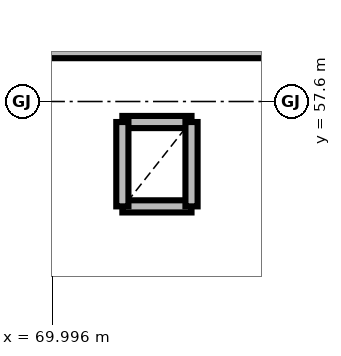
"""IFC4 building model, lengths in metres.
Left out: names, types, materials, properties, quantities, classifications, styles, units other than length and angle.
Written with IfcOpenShell. Run it as: python <this file> out.ifc"""

import sys

from ifc_helpers import new_model, si_unit, direction, frame, frame_2d, origin, place, context, subcontext, project, spatial, rectangle, extrude, element, save


model = new_model("IFC4")
c1 = context("Model", 3, precision=1e-05, world=origin(), true_north=direction((0.0, 1.0)))
c2 = subcontext(c1, "Body", "Model", "MODEL_VIEW")
j1 = project(units=[si_unit("LENGTHUNIT", "METRE"), si_unit("PLANEANGLEUNIT", "RADIAN")], contexts=[c1])
p1 = place(None, origin())
s1 = spatial("IfcSite", under=j1, at=p1, CompositionType="ELEMENT")
p2 = place(p1, origin())
s2 = spatial("IfcBuilding", under=s1, at=p2, CompositionType="ELEMENT")
p3 = place(p2, frame((0.0, 0.0, 9.3)))
s3 = spatial("IfcBuildingStorey", under=s2, at=p3, CompositionType="ELEMENT", Elevation=9.3)
p4 = place(p3, frame((70.92, 56.22, 0.0), z_axis=(0.0, 0.0, 1.0), x_axis=(1.0, 0.0, 0.0)))
e1 = element("IfcWall", 1, at=p4, inside=s3, PredefinedType="PARTITIONING", context=c2, shape_type="SweptSolid", body=[
    extrude(rectangle(XDim=0.91, YDim=0.16, at=frame_2d((0.455, 0.0))), origin(), (0.0, 0.0, 1.0), 3.475),
])
p5 = place(p3, frame((71.83, 57.33, 0.0), z_axis=(0.0, 0.0, 1.0), x_axis=(-1.0, 0.0, 0.0)))
e2 = element("IfcWall", 2, at=p5, inside=s3, PredefinedType="PARTITIONING", context=c2, shape_type="SweptSolid", body=[
    extrude(rectangle(XDim=0.91, YDim=0.16, at=frame_2d((0.455, 0.0))), origin(), (0.0, 0.0, 1.0), 3.175),
])
for number, where, z_axis, x_axis in (
    (3, (70.92, 57.33, 0.0), (0.0, 0.0, 1.0), (0.0, -1.0, 0.0)),
    (4, (71.83, 56.22, 0.0), (0.0, 0.0, 1.0), (0.0, 1.0, 0.0)),
):
    element("IfcWall", number, at=place(p3, frame(where, z_axis=z_axis, x_axis=x_axis)), inside=s3, PredefinedType="PARTITIONING", context=c2, shape_type="SweptSolid", body=[
        extrude(rectangle(XDim=1.11, YDim=0.16, at=frame_2d((0.555, 0.0))), origin(), (0.0, 0.0, 1.0), 3.175),
    ])
p6 = place(p3, frame((93.31, 58.25, 0.0), z_axis=(0.0, 0.0, 1.0), x_axis=(-1.0, 0.0, 0.0)))
e5 = element("IfcWall", 5, at=p6, inside=s3, PredefinedType="PARTITIONING", context=c2, shape_type="SweptSolid", body=[
    extrude(rectangle(XDim=45.74, YDim=0.16, at=frame_2d((22.87, 0.0))), origin(), (0.0, 0.0, 1.0), 3.325),
])
p7 = place(p6, frame((43.84, 0.0, 0.0)))
e6 = element("IfcOpeningElement", 6, at=p7, cuts=e5, PredefinedType="OPENING", context=c2, shape_type="SweptSolid", body=[
    extrude(rectangle(XDim=1.45, YDim=2.2, at=frame_2d((0.725, 1.1))), frame((0.0, 0.09, 0.0), z_axis=(0.0, -1.0, 0.0), x_axis=(1.0, 0.0, 0.0)), (0.0, 0.0, 1.0), 0.18),
])
save(model, sys.argv[1])
